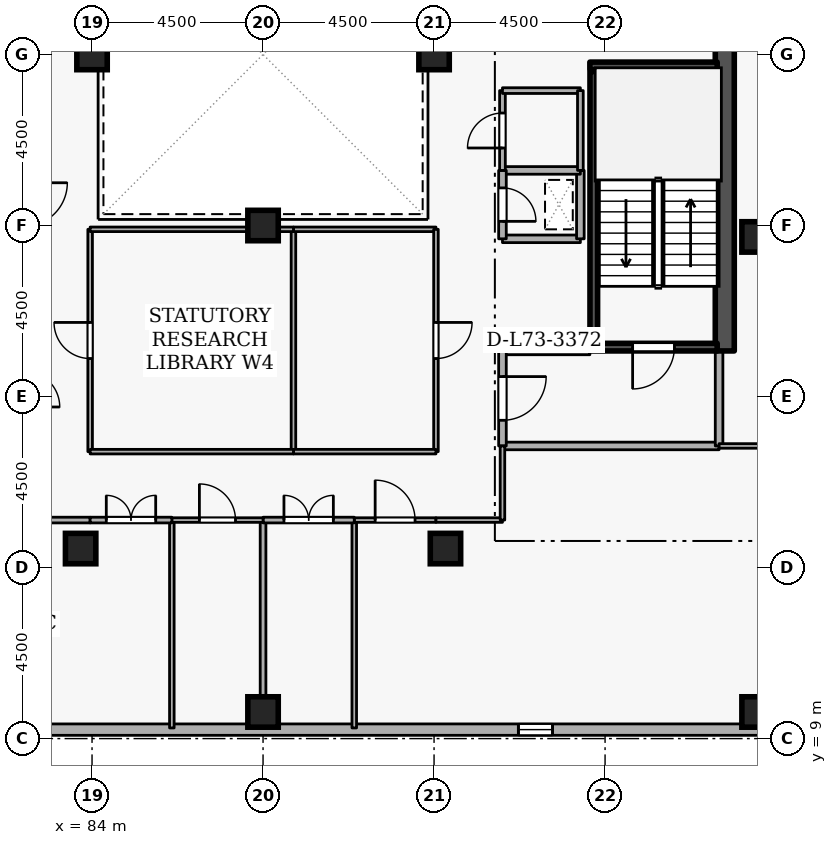
"""IFC4 building model, lengths in metres.
Left out: names, types, materials, properties, quantities, classifications, styles, units other than length and angle.
Written with IfcOpenShell. Run it as: python <this file> out.ifc"""

import sys

from ifc_helpers import new_model, si_unit, direction, frame, frame_2d, origin, origin_2d, place, context, subcontext, project, spatial, rectangle, extrude, element, fill, save


model = new_model("IFC4")
c1 = context("Model", 3, precision=1e-05, world=origin(), true_north=direction((0.0, 1.0)))
c2 = subcontext(c1, "Body", "Model", "MODEL_VIEW")
j1 = project(units=[si_unit("LENGTHUNIT", "METRE"), si_unit("PLANEANGLEUNIT", "RADIAN")], contexts=[c1])
p1 = place(None, origin())
s1 = spatial("IfcSite", under=j1, at=p1, CompositionType="ELEMENT")
p2 = place(p1, origin())
s2 = spatial("IfcBuilding", under=s1, at=p2, CompositionType="ELEMENT")
p3 = place(p2, frame((0.0, 0.0, 272.7)))
s3 = spatial("IfcBuildingStorey", under=s2, at=p3, CompositionType="ELEMENT", Elevation=272.7)
p4 = place(p3, frame((100.65, 19.2, 0.0), z_axis=(0.0, 0.0, 1.0), x_axis=(0.0, 1.0, 0.0)))
e1 = element("IfcWall", 1, at=p4, inside=s3, PredefinedType="SHEAR", context=c2, shape_type="SweptSolid", body=[
    extrude(rectangle(XDim=15.6, YDim=0.5, at=frame_2d((7.8, 0.0))), origin(), (0.0, 0.0, 1.0), 3.6),
])
for number, where, z_axis, x_axis in (
    (2, (101.5, 9.7, 0.0), (0.0, 0.0, 1.0), (1.0, 0.0, 0.0)),
    (3, (88.5, 9.7, 0.0), (0.0, 0.0, 1.0), (1.0, 0.0, 0.0)),
    (4, (93.3, 14.0, 0.0), (0.0, 0.0, 1.0), (1.0, 0.0, 0.0)),
    (5, (83.7, 14.0, 0.0), (0.0, 0.0, 1.0), (1.0, 0.0, 0.0)),
    (6, (101.5, 22.2, 0.0), (0.0, 0.0, 1.0), (1.0, 0.0, 0.0)),
    (7, (93.0, 27.0, 0.0), (0.0, 0.0, 1.0), (1.0, 0.0, 0.0)),
    (8, (84.0, 27.0, 0.0), (0.0, 0.0, 1.0), (1.0, 0.0, 0.0)),
    (9, (88.5, 22.5, 0.0), (0.0, 0.0, 1.0), (1.0, 0.0, 0.0)),
):
    element("IfcColumn", number, at=place(p3, frame(where, z_axis=z_axis, x_axis=x_axis)), inside=s3, PredefinedType="COLUMN", context=c2, shape_type="SweptSolid", body=[
        extrude(rectangle(XDim=0.8, YDim=0.8, at=origin_2d()), origin(), (0.0, 0.0, 1.0), 3.6),
    ])
p5 = place(p3, frame((73.319, 9.235, 0.0), z_axis=(0.0, 0.0, 1.0), x_axis=(0.999999999634, 2.7061402e-05, 0.0)))
e10 = element("IfcWall", 10, at=p5, inside=s3, PredefinedType="STANDARD", context=c2, shape_type="SweptSolid", body=[
    extrude(rectangle(XDim=36.087, YDim=0.3, at=frame_2d((18.043, 0.0))), origin(), (0.0, 0.0, 1.0), 2.7),
])
p6 = place(p5, frame((7.5, 0.0, 0.72)))
e11 = element("IfcOpeningElement", 11, at=p6, cuts=e10, PredefinedType="OPENING", context=c2, shape_type="SweptSolid", body=[
    extrude(rectangle(XDim=0.9, YDim=1.75, at=frame_2d((0.45, 0.875))), frame((0.0, 0.16, 0.0), z_axis=(0.0, -1.0, 0.0), x_axis=(1.0, 0.0, 0.0)), (0.0, 0.0, 1.0), 0.32),
])
p7 = place(p5, frame((21.9, 0.0, 0.72)))
e12 = element("IfcOpeningElement", 12, at=p7, cuts=e10, PredefinedType="OPENING", context=c2, shape_type="SweptSolid", body=[
    extrude(rectangle(XDim=0.9, YDim=1.75, at=frame_2d((0.45, 0.875))), frame((0.0, 0.16, 0.0), z_axis=(0.0, -1.0, 0.0), x_axis=(1.0, 0.0, 0.0)), (0.0, 0.0, 1.0), 0.32),
])
p8 = place(p5, frame((31.5, 0.0, 0.72)))
e13 = element("IfcOpeningElement", 13, at=p8, cuts=e10, PredefinedType="OPENING", context=c2, shape_type="SweptSolid", body=[
    extrude(rectangle(XDim=0.9, YDim=1.75, at=frame_2d((0.45, 0.875))), frame((0.0, 0.16, 0.0), z_axis=(0.0, -1.0, 0.0), x_axis=(1.0, 0.0, 0.0)), (0.0, 0.0, 1.0), 0.32),
])
p9 = place(p3, frame((100.45, 19.3, 0.0), z_axis=(0.0, 0.0, 1.0), x_axis=(-1.0, 0.0, 0.0)))
e14 = element("IfcWall", 14, at=p9, inside=s3, PredefinedType="SHEAR", context=c2, shape_type="SweptSolid", body=[
    extrude(rectangle(XDim=3.35, YDim=0.2, at=frame_2d((1.675, 0.0))), origin(), (0.0, 0.0, 1.0), 3.6),
])
p10 = place(p9, frame((1.125, 0.0, 0.0)))
e15 = element("IfcOpeningElement", 15, at=p10, cuts=e14, PredefinedType="OPENING", context=c2, shape_type="SweptSolid", body=[
    extrude(rectangle(XDim=1.1, YDim=2.1, at=frame_2d((0.55, 1.05))), frame((0.0, 0.11, 0.0), z_axis=(0.0, -1.0, 0.0), x_axis=(1.0, 0.0, 0.0)), (0.0, 0.0, 1.0), 0.22),
])
p11 = place(p3, frame((97.1, 26.7, 0.0), z_axis=(0.0, 0.0, 1.0), x_axis=(1.0, 0.0, 0.0)))
e16 = element("IfcWall", 16, at=p11, inside=s3, PredefinedType="SHEAR", context=c2, shape_type="SweptSolid", body=[
    extrude(rectangle(XDim=3.35, YDim=0.2, at=frame_2d((1.675, 0.0))), origin(), (0.0, 0.0, 1.0), 3.6),
])
p12 = place(p3, frame((97.203, 26.55, 0.0), z_axis=(0.0, 0.0, 1.0), x_axis=(0.0, -1.0, 0.0)))
e17 = element("IfcWall", 17, at=p12, inside=s3, PredefinedType="SHEAR", context=c2, shape_type="SweptSolid", body=[
    extrude(rectangle(XDim=7.1, YDim=0.2, at=frame_2d((3.55, 0.0))), origin(), (0.0, 0.0, 1.0), 3.6),
])
p13 = place(p3, frame((94.8, 16.7, 0.0), z_axis=(0.0, 0.0, 1.0), x_axis=(1.0, 0.0, 0.0)))
e18 = element("IfcWall", 18, at=p13, inside=s3, PredefinedType="STANDARD", context=c2, shape_type="SweptSolid", body=[
    extrude(rectangle(XDim=5.7, YDim=0.2, at=frame_2d((2.85, 0.0))), origin(), (0.0, 0.0, 1.0), 3.34),
])
p14 = place(p3, frame((100.5, 16.7, 0.0), z_axis=(0.0, 0.0, 1.0), x_axis=(0.0, 1.0, 0.0)))
e19 = element("IfcWall", 19, at=p14, inside=s3, PredefinedType="STANDARD", context=c2, shape_type="SweptSolid", body=[
    extrude(rectangle(XDim=2.5, YDim=0.2, at=frame_2d((1.25, 0.0))), origin(), (0.0, 0.0, 1.0), 3.34),
])
p15 = place(p3, frame((97.1, 19.2, 0.0), z_axis=(0.0, 0.0, 1.0), x_axis=(-1.0, 0.0, 0.0)))
e20 = element("IfcWall", 20, at=p15, inside=s3, PredefinedType="STANDARD", context=c2, shape_type="SweptSolid", body=[
    extrude(rectangle(XDim=2.3, YDim=0.2, at=frame_2d((1.15, 0.0))), origin(), (0.0, 0.0, 1.0), 2.545),
])
p16 = place(p3, frame((94.8, 19.2, 0.0), z_axis=(0.0, 0.0, 1.0), x_axis=(0.0, -1.0, 0.0)))
e21 = element("IfcWall", 21, at=p16, inside=s3, PredefinedType="STANDARD", context=c2, shape_type="SweptSolid", body=[
    extrude(rectangle(XDim=2.5, YDim=0.2, at=frame_2d((1.25, 0.0))), origin(), (0.0, 0.0, 1.0), 3.34),
])
p17 = place(p16, frame((0.675, 0.0, 0.0)))
e22 = element("IfcOpeningElement", 22, at=p17, cuts=e21, PredefinedType="OPENING", context=c2, shape_type="SweptSolid", body=[
    extrude(rectangle(XDim=1.15, YDim=2.1, at=frame_2d((0.575, 1.05))), frame((0.0, 0.11, 0.0), z_axis=(0.0, -1.0, 0.0), x_axis=(1.0, 0.0, 0.0)), (0.0, 0.0, 1.0), 0.22),
])
p18 = place(p3, frame((94.8, 22.15, 0.0), z_axis=(0.0, 0.0, 1.0), x_axis=(1.0, 0.0, 0.0)))
e23 = element("IfcWall", 23, at=p18, inside=s3, PredefinedType="STANDARD", context=c2, shape_type="SweptSolid", body=[
    extrude(rectangle(XDim=2.05, YDim=0.2, at=frame_2d((1.025, 0.0))), origin(), (0.0, 0.0, 1.0), 3.34),
])
p19 = place(p3, frame((96.85, 22.15, 0.0), z_axis=(0.0, 0.0, 1.0), x_axis=(0.0, 1.0, 0.0)))
e24 = element("IfcWall", 24, at=p19, inside=s3, PredefinedType="STANDARD", context=c2, shape_type="SweptSolid", body=[
    extrude(rectangle(XDim=1.8, YDim=0.2, at=frame_2d((0.9, 0.0))), origin(), (0.0, 0.0, 1.0), 3.34),
])
p20 = place(p3, frame((96.85, 23.95, 0.0), z_axis=(0.0, 0.0, 1.0), x_axis=(-1.0, 0.0, 0.0)))
e25 = element("IfcWall", 25, at=p20, inside=s3, PredefinedType="STANDARD", context=c2, shape_type="SweptSolid", body=[
    extrude(rectangle(XDim=2.05, YDim=0.2, at=frame_2d((1.025, 0.0))), origin(), (0.0, 0.0, 1.0), 3.34),
])
p21 = place(p3, frame((94.8, 23.95, 0.0), z_axis=(0.0, 0.0, 1.0), x_axis=(0.0, -1.0, 0.0)))
e26 = element("IfcWall", 26, at=p21, inside=s3, PredefinedType="STANDARD", context=c2, shape_type="SweptSolid", body=[
    extrude(rectangle(XDim=1.8, YDim=0.2, at=frame_2d((0.9, 0.0))), origin(), (0.0, 0.0, 1.0), 3.34),
])
p22 = place(p21, frame((0.46, 0.0, 0.0)))
e27 = element("IfcOpeningElement", 27, at=p22, cuts=e26, PredefinedType="OPENING", context=c2, shape_type="SweptSolid", body=[
    extrude(rectangle(XDim=0.88, YDim=2.04, at=frame_2d((0.44, 1.02))), frame((0.0, 0.11, 0.0), z_axis=(0.0, -1.0, 0.0), x_axis=(1.0, 0.0, 0.0)), (0.0, 0.0, 1.0), 0.22),
])
p23 = place(p3, frame((94.8, 23.95, 0.0), z_axis=(0.0, 0.0, 1.0), x_axis=(0.0, 1.0, 0.0)))
e28 = element("IfcWall", 28, at=p23, inside=s3, PredefinedType="PARTITIONING", context=c2, shape_type="SweptSolid", body=[
    extrude(rectangle(XDim=2.1, YDim=0.15, at=frame_2d((1.05, 0.0))), origin(), (0.0, 0.0, 1.0), 3.34),
])
p24 = place(p23, frame((0.59, 0.0, 0.0)))
e29 = element("IfcOpeningElement", 29, at=p24, cuts=e28, PredefinedType="OPENING", context=c2, shape_type="SweptSolid", body=[
    extrude(rectangle(XDim=0.92, YDim=2.08, at=frame_2d((0.46, 1.04))), frame((0.0, 0.085, 0.0), z_axis=(0.0, -1.0, 0.0), x_axis=(1.0, 0.0, 0.0)), (0.0, 0.0, 1.0), 0.17),
])
p25 = place(p3, frame((94.8, 26.05, 0.0), z_axis=(0.0, 0.0, 1.0), x_axis=(1.0, 0.0, 0.0)))
e30 = element("IfcWall", 30, at=p25, inside=s3, PredefinedType="PARTITIONING", context=c2, shape_type="SweptSolid", body=[
    extrude(rectangle(XDim=2.05, YDim=0.15, at=frame_2d((1.025, 0.0))), origin(), (0.0, 0.0, 1.0), 3.34),
])
p26 = place(p3, frame((96.85, 26.05, 0.0), z_axis=(0.0, 0.0, 1.0), x_axis=(0.0, -1.0, 0.0)))
e31 = element("IfcWall", 31, at=p26, inside=s3, PredefinedType="PARTITIONING", context=c2, shape_type="SweptSolid", body=[
    extrude(rectangle(XDim=2.1, YDim=0.15, at=frame_2d((1.05, 0.0))), origin(), (0.0, 0.0, 1.0), 3.34),
])
p27 = place(p3, frame((90.9, 9.28, 0.0), z_axis=(0.0, 0.0, 1.0), x_axis=(0.0, 1.0, 0.0)))
e32 = element("IfcWall", 32, at=p27, inside=s3, PredefinedType="PARTITIONING", context=c2, shape_type="SweptSolid", body=[
    extrude(rectangle(XDim=5.47, YDim=0.12, at=frame_2d((2.735, 0.0))), origin(), (0.0, 0.0, 1.0), 3.34),
])
p28 = place(p3, frame((90.9, 14.75, 0.0), z_axis=(0.0, 0.0, 1.0), x_axis=(1.0, 0.0, 0.0)))
e33 = element("IfcWall", 33, at=p28, inside=s3, PredefinedType="PARTITIONING", context=c2, shape_type="SweptSolid", body=[
    extrude(rectangle(XDim=2.15, YDim=0.12, at=frame_2d((1.075, 0.0))), origin(), (0.0, 0.0, 1.0), 3.34),
])
p29 = place(p28, frame((0.55, 0.0, 0.0)))
e34 = element("IfcOpeningElement", 34, at=p29, cuts=e33, PredefinedType="OPENING", context=c2, shape_type="SweptSolid", body=[
    extrude(rectangle(XDim=1.05, YDim=2.1, at=frame_2d((0.525, 1.05))), frame((0.0, 0.07, 0.0), z_axis=(0.0, -1.0, 0.0), x_axis=(1.0, 0.0, 0.0)), (0.0, 0.0, 1.0), 0.14),
])
p30 = place(p3, frame((93.05, 14.75, 0.0), z_axis=(0.0, 0.0, 1.0), x_axis=(1.0, 0.0, 0.0)))
e35 = element("IfcWall", 35, at=p30, inside=s3, PredefinedType="PARTITIONING", context=c2, shape_type="SweptSolid", body=[
    extrude(rectangle(XDim=1.75, YDim=0.12, at=frame_2d((0.875, 0.0))), origin(), (0.0, 0.0, 1.0), 3.34),
])
p31 = place(p3, frame((94.8, 14.75, 0.0), z_axis=(0.0, 0.0, 1.0), x_axis=(0.0, 1.0, 0.0)))
e36 = element("IfcWall", 36, at=p31, inside=s3, PredefinedType="PARTITIONING", context=c2, shape_type="SweptSolid", body=[
    extrude(rectangle(XDim=1.95, YDim=0.12, at=frame_2d((0.975, 0.0))), origin(), (0.0, 0.0, 1.0), 3.34),
])
p32 = place(p3, frame((100.5, 16.7, 0.0), z_axis=(0.0, 0.0, 1.0), x_axis=(1.0, 0.0, 0.0)))
e37 = element("IfcWall", 37, at=p32, inside=s3, PredefinedType="PARTITIONING", context=c2, shape_type="SweptSolid", body=[
    extrude(rectangle(XDim=11.72, YDim=0.12, at=frame_2d((5.86, 0.0))), origin(), (0.0, 0.0, 1.0), 3.34),
])
p33 = place(p3, frame((88.5, 9.28, 0.0), z_axis=(0.0, 0.0, 1.0), x_axis=(0.0, 1.0, 0.0)))
e38 = element("IfcWall", 38, at=p33, inside=s3, PredefinedType="PARTITIONING", context=c2, shape_type="SweptSolid", body=[
    extrude(rectangle(XDim=5.47, YDim=0.15, at=frame_2d((2.735, 0.0))), origin(), (0.0, 0.0, 1.0), 2.882),
])
p34 = place(p3, frame((88.5, 14.75, 0.0), z_axis=(0.0, 0.0, 1.0), x_axis=(1.0, 0.0, 0.0)))
e39 = element("IfcWall", 39, at=p34, inside=s3, PredefinedType="PARTITIONING", context=c2, shape_type="SweptSolid", body=[
    extrude(rectangle(XDim=2.4, YDim=0.15, at=frame_2d((1.2, 0.0))), origin(), (0.0, 0.0, 1.0), 3.34),
])
p35 = place(p34, frame((0.55, 0.0, 0.0)))
e40 = element("IfcOpeningElement", 40, at=p35, cuts=e39, PredefinedType="OPENING", context=c2, shape_type="SweptSolid", body=[
    extrude(rectangle(XDim=1.3, YDim=2.12, at=frame_2d((0.65, 1.06))), frame((0.0, 0.085, 0.0), z_axis=(0.0, -1.0, 0.0), x_axis=(1.0, 0.0, 0.0)), (0.0, 0.0, 1.0), 0.17),
])
p36 = place(p3, frame((86.1, 9.28, 0.0), z_axis=(0.0, 0.0, 1.0), x_axis=(0.0, 1.0, 0.0)))
e41 = element("IfcWall", 41, at=p36, inside=s3, PredefinedType="PARTITIONING", context=c2, shape_type="SweptSolid", body=[
    extrude(rectangle(XDim=5.47, YDim=0.12, at=frame_2d((2.735, 0.0))), origin(), (0.0, 0.0, 1.0), 3.34),
])
p37 = place(p3, frame((86.1, 14.75, 0.0), z_axis=(0.0, 0.0, 1.0), x_axis=(1.0, 0.0, 0.0)))
e42 = element("IfcWall", 42, at=p37, inside=s3, PredefinedType="PARTITIONING", context=c2, shape_type="SweptSolid", body=[
    extrude(rectangle(XDim=2.4, YDim=0.12, at=frame_2d((1.2, 0.0))), origin(), (0.0, 0.0, 1.0), 3.34),
])
p38 = place(p37, frame((0.725, 0.0, 0.0)))
e43 = element("IfcOpeningElement", 43, at=p38, cuts=e42, PredefinedType="OPENING", context=c2, shape_type="SweptSolid", body=[
    extrude(rectangle(XDim=0.95, YDim=2.1, at=frame_2d((0.475, 1.05))), frame((0.0, 0.07, 0.0), z_axis=(0.0, -1.0, 0.0), x_axis=(1.0, 0.0, 0.0)), (0.0, 0.0, 1.0), 0.14),
])
p39 = place(p3, frame((82.2, 14.75, 0.0), z_axis=(0.0, 0.0, 1.0), x_axis=(1.0, 0.0, 0.0)))
e44 = element("IfcWall", 44, at=p39, inside=s3, PredefinedType="PARTITIONING", context=c2, shape_type="SweptSolid", body=[
    extrude(rectangle(XDim=1.75, YDim=0.15, at=frame_2d((0.875, 0.0))), origin(), (0.0, 0.0, 1.0), 3.34),
])
p40 = place(p3, frame((83.95, 14.75, 0.0), z_axis=(0.0, 0.0, 1.0), x_axis=(1.0, 0.0, 0.0)))
e45 = element("IfcWall", 45, at=p40, inside=s3, PredefinedType="PARTITIONING", context=c2, shape_type="SweptSolid", body=[
    extrude(rectangle(XDim=2.15, YDim=0.15, at=frame_2d((1.075, 0.0))), origin(), (0.0, 0.0, 1.0), 3.34),
])
p41 = place(p40, frame((0.425, 0.0, 0.0)))
e46 = element("IfcOpeningElement", 46, at=p41, cuts=e45, PredefinedType="OPENING", context=c2, shape_type="SweptSolid", body=[
    extrude(rectangle(XDim=1.3, YDim=2.12, at=frame_2d((0.65, 1.06))), frame((0.0, 0.085, 0.0), z_axis=(0.0, -1.0, 0.0), x_axis=(1.0, 0.0, 0.0)), (0.0, 0.0, 1.0), 0.17),
])
p42 = place(p3, frame((89.3, 16.55, 0.0), z_axis=(0.0, 0.0, 1.0), x_axis=(0.0, 1.0, 0.0)))
e47 = element("IfcWall", 47, at=p42, inside=s3, PredefinedType="PARTITIONING", context=c2, shape_type="SweptSolid", body=[
    extrude(rectangle(XDim=5.85, YDim=0.12, at=frame_2d((2.925, 0.0))), origin(), (0.0, 0.0, 1.0), 3.34),
])
p43 = place(p3, frame((89.3, 22.4, 0.0), z_axis=(0.0, 0.0, 1.0), x_axis=(1.0, 0.0, 0.0)))
e48 = element("IfcWall", 48, at=p43, inside=s3, PredefinedType="PARTITIONING", context=c2, shape_type="SweptSolid", body=[
    extrude(rectangle(XDim=3.75, YDim=0.12, at=frame_2d((1.875, 0.0))), origin(), (0.0, 0.0, 1.0), 3.34),
])
p44 = place(p3, frame((93.05, 22.4, 0.0), z_axis=(0.0, 0.0, 1.0), x_axis=(0.0, -1.0, 0.0)))
e49 = element("IfcWall", 49, at=p44, inside=s3, PredefinedType="PARTITIONING", context=c2, shape_type="SweptSolid", body=[
    extrude(rectangle(XDim=5.85, YDim=0.12, at=frame_2d((2.925, 0.0))), origin(), (0.0, 0.0, 1.0), 3.34),
])
p45 = place(p44, frame((2.45, 0.0, 0.0)))
e50 = element("IfcOpeningElement", 50, at=p45, cuts=e49, PredefinedType="OPENING", context=c2, shape_type="SweptSolid", body=[
    extrude(rectangle(XDim=0.95, YDim=2.1, at=frame_2d((0.475, 1.05))), frame((0.0, 0.07, 0.0), z_axis=(0.0, -1.0, 0.0), x_axis=(1.0, 0.0, 0.0)), (0.0, 0.0, 1.0), 0.14),
])
p46 = place(p3, frame((93.05, 16.55, 0.0), z_axis=(0.0, 0.0, 1.0), x_axis=(-1.0, 0.0, 0.0)))
e51 = element("IfcWall", 51, at=p46, inside=s3, PredefinedType="PARTITIONING", context=c2, shape_type="SweptSolid", body=[
    extrude(rectangle(XDim=3.75, YDim=0.12, at=frame_2d((1.875, 0.0))), origin(), (0.0, 0.0, 1.0), 3.34),
])
p47 = place(p3, frame((83.95, 16.55, 0.0), z_axis=(0.0, 0.0, 1.0), x_axis=(0.0, 1.0, 0.0)))
e52 = element("IfcWall", 52, at=p47, inside=s3, PredefinedType="PARTITIONING", context=c2, shape_type="SweptSolid", body=[
    extrude(rectangle(XDim=5.85, YDim=0.12, at=frame_2d((2.925, 0.0))), origin(), (0.0, 0.0, 1.0), 3.34),
])
p48 = place(p47, frame((2.45, 0.0, 0.0)))
e53 = element("IfcOpeningElement", 53, at=p48, cuts=e52, PredefinedType="OPENING", context=c2, shape_type="SweptSolid", body=[
    extrude(rectangle(XDim=0.95, YDim=2.1, at=frame_2d((0.475, 1.05))), frame((0.0, 0.07, 0.0), z_axis=(0.0, -1.0, 0.0), x_axis=(1.0, 0.0, 0.0)), (0.0, 0.0, 1.0), 0.14),
])
for number, where, z_axis, x_axis in (
    (54, (83.95, 22.4, 0.0), (0.0, 0.0, 1.0), (1.0, 0.0, 0.0)),
    (55, (89.3, 16.55, 0.0), (0.0, 0.0, 1.0), (-1.0, 0.0, 0.0)),
):
    element("IfcWall", number, at=place(p3, frame(where, z_axis=z_axis, x_axis=x_axis)), inside=s3, PredefinedType="PARTITIONING", context=c2, shape_type="SweptSolid", body=[
        extrude(rectangle(XDim=5.35, YDim=0.12, at=frame_2d((2.675, 0.0))), origin(), (0.0, 0.0, 1.0), 3.34),
    ])
p49 = place(p7, origin())
e56 = element("IfcWindow", 56, at=p49, inside=s3, PartitioningType="SINGLE_PANEL", PredefinedType="WINDOW", context=c2, shape_type="SweptSolid", body=[
    extrude(rectangle(XDim=0.9, YDim=1.75, at=frame_2d((0.45, 0.875))), frame((0.0, 0.03, 0.0), z_axis=(0.0, -1.0, 0.0), x_axis=(1.0, 0.0, 0.0)), (0.0, 0.0, 1.0), 0.06),
])
fill(e12, e56)
p50 = place(p10, origin())
e57 = element("IfcDoor", 57, at=p50, inside=s3, OperationType="SINGLE_SWING_RIGHT", PredefinedType="DOOR", context=c2, shape_type="SweptSolid", body=[
    extrude(rectangle(XDim=1.1, YDim=2.1, at=frame_2d((0.55, 1.05))), frame((0.0, 0.025, 0.0), z_axis=(0.0, -1.0, 0.0), x_axis=(1.0, 0.0, 0.0)), (0.0, 0.0, 1.0), 0.05),
])
fill(e15, e57)
p51 = place(p17, origin())
e58 = element("IfcDoor", 58, at=p51, inside=s3, OperationType="SINGLE_SWING_LEFT", PredefinedType="DOOR", context=c2, shape_type="SweptSolid", body=[
    extrude(rectangle(XDim=1.15, YDim=2.1, at=frame_2d((0.575, 1.05))), frame((0.0, 0.025, 0.0), z_axis=(0.0, -1.0, 0.0), x_axis=(1.0, 0.0, 0.0)), (0.0, 0.0, 1.0), 0.05),
])
fill(e22, e58)
p52 = place(p22, origin())
e59 = element("IfcDoor", 59, at=p52, inside=s3, OperationType="SINGLE_SWING_RIGHT", PredefinedType="DOOR", context=c2, shape_type="SweptSolid", body=[
    extrude(rectangle(XDim=0.88, YDim=2.04, at=frame_2d((0.44, 1.02))), frame((0.0, 0.025, 0.0), z_axis=(0.0, -1.0, 0.0), x_axis=(1.0, 0.0, 0.0)), (0.0, 0.0, 1.0), 0.05),
])
fill(e27, e59)
p53 = place(p24, origin())
e60 = element("IfcDoor", 60, at=p53, inside=s3, OperationType="SINGLE_SWING_LEFT", PredefinedType="DOOR", context=c2, shape_type="SweptSolid", body=[
    extrude(rectangle(XDim=0.92, YDim=2.08, at=frame_2d((0.46, 1.04))), frame((0.0, 0.025, 0.0), z_axis=(0.0, -1.0, 0.0), x_axis=(1.0, 0.0, 0.0)), (0.0, 0.0, 1.0), 0.05),
])
fill(e29, e60)
p54 = place(p29, origin())
e61 = element("IfcDoor", 61, at=p54, inside=s3, OperationType="SINGLE_SWING_LEFT", PredefinedType="DOOR", context=c2, shape_type="SweptSolid", body=[
    extrude(rectangle(XDim=1.05, YDim=2.1, at=frame_2d((0.525, 1.05))), frame((0.0, 0.025, 0.0), z_axis=(0.0, -1.0, 0.0), x_axis=(1.0, 0.0, 0.0)), (0.0, 0.0, 1.0), 0.05),
])
fill(e34, e61)
p55 = place(p35, origin())
e62 = element("IfcDoor", 62, at=p55, inside=s3, OperationType="DOUBLE_DOOR_SINGLE_SWING", PredefinedType="DOOR", context=c2, shape_type="SweptSolid", body=[
    extrude(rectangle(XDim=1.3, YDim=2.12, at=frame_2d((0.65, 1.06))), frame((0.0, 0.025, 0.0), z_axis=(0.0, -1.0, 0.0), x_axis=(1.0, 0.0, 0.0)), (0.0, 0.0, 1.0), 0.05),
])
fill(e40, e62)
p56 = place(p38, origin())
e63 = element("IfcDoor", 63, at=p56, inside=s3, OperationType="SINGLE_SWING_LEFT", PredefinedType="DOOR", context=c2, shape_type="SweptSolid", body=[
    extrude(rectangle(XDim=0.95, YDim=2.1, at=frame_2d((0.475, 1.05))), frame((0.0, 0.025, 0.0), z_axis=(0.0, -1.0, 0.0), x_axis=(1.0, 0.0, 0.0)), (0.0, 0.0, 1.0), 0.05),
])
fill(e43, e63)
p57 = place(p41, origin())
e64 = element("IfcDoor", 64, at=p57, inside=s3, OperationType="DOUBLE_DOOR_SINGLE_SWING", PredefinedType="DOOR", context=c2, shape_type="SweptSolid", body=[
    extrude(rectangle(XDim=1.3, YDim=2.12, at=frame_2d((0.65, 1.06))), frame((0.0, 0.025, 0.0), z_axis=(0.0, -1.0, 0.0), x_axis=(1.0, 0.0, 0.0)), (0.0, 0.0, 1.0), 0.05),
])
fill(e46, e64)
p58 = place(p45, origin())
e65 = element("IfcDoor", 65, at=p58, inside=s3, OperationType="SINGLE_SWING_LEFT", PredefinedType="DOOR", context=c2, shape_type="SweptSolid", body=[
    extrude(rectangle(XDim=0.95, YDim=2.1, at=frame_2d((0.475, 1.05))), frame((0.0, 0.025, 0.0), z_axis=(0.0, -1.0, 0.0), x_axis=(1.0, 0.0, 0.0)), (0.0, 0.0, 1.0), 0.05),
])
fill(e50, e65)
p59 = place(p48, origin())
e66 = element("IfcDoor", 66, at=p59, inside=s3, OperationType="SINGLE_SWING_RIGHT", PredefinedType="DOOR", context=c2, shape_type="SweptSolid", body=[
    extrude(rectangle(XDim=0.95, YDim=2.1, at=frame_2d((0.475, 1.05))), frame((0.0, 0.025, 0.0), z_axis=(0.0, -1.0, 0.0), x_axis=(1.0, 0.0, 0.0)), (0.0, 0.0, 1.0), 0.05),
])
fill(e53, e66)
save(model, sys.argv[1])
